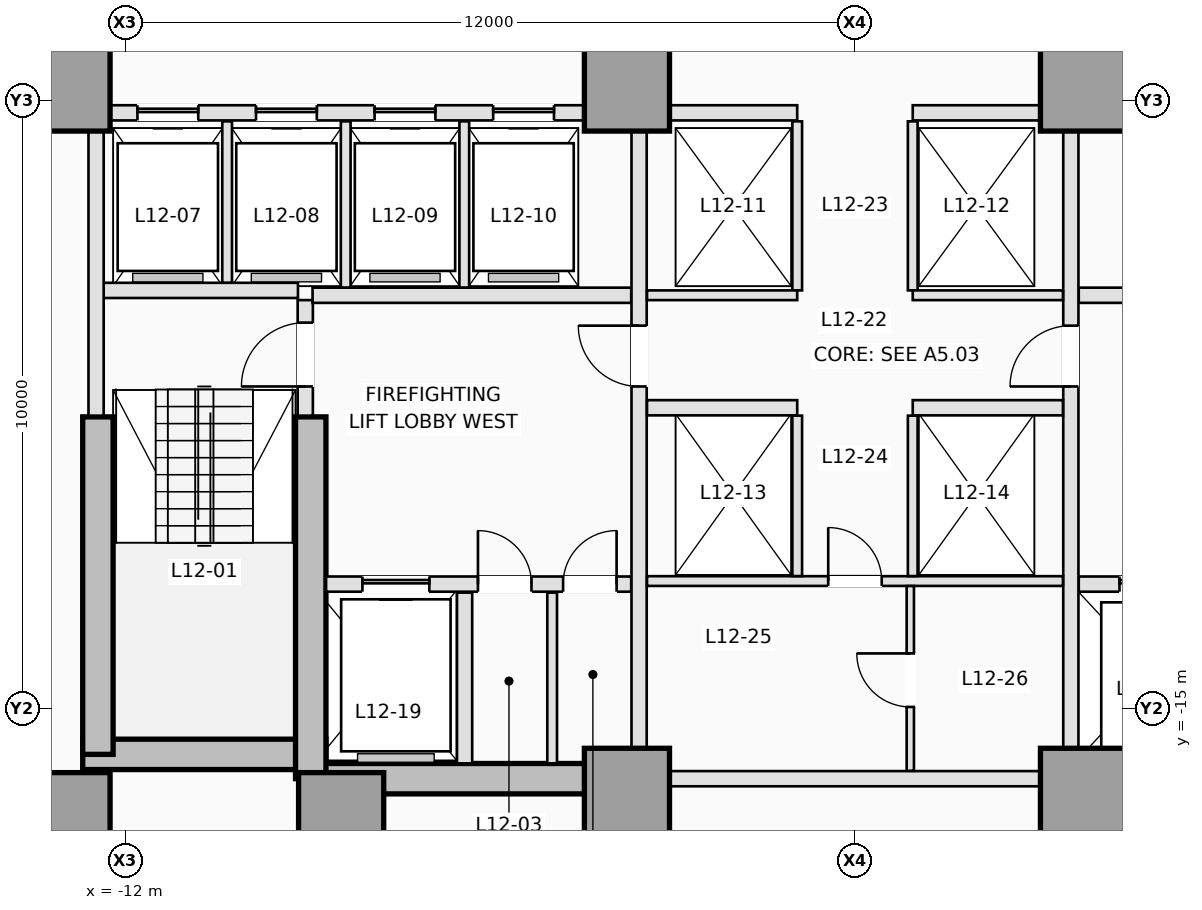
"""IFC4 building model, lengths in metres.
Left out: names, types, materials, properties, quantities, classifications, styles, units other than length and angle.
Written with IfcOpenShell. Run it as: python <this file> out.ifc"""

import sys

from ifc_helpers import new_model, si_unit, direction, frame, frame_2d, origin, origin_2d, place, context, subcontext, project, spatial, rectangle, extrude, element, fill, save


model = new_model("IFC4")
c1 = context("Model", 3, precision=1e-05, world=origin(), true_north=direction((0.0, 1.0)))
c2 = subcontext(c1, "Body", "Model", "MODEL_VIEW")
j1 = project(units=[si_unit("LENGTHUNIT", "METRE"), si_unit("PLANEANGLEUNIT", "RADIAN")], contexts=[c1])
p1 = place(None, origin())
s1 = spatial("IfcSite", under=j1, at=p1, CompositionType="ELEMENT")
p2 = place(p1, origin())
s2 = spatial("IfcBuilding", under=s1, at=p2, CompositionType="ELEMENT")
p3 = place(p2, frame((0.0, 0.0, 48.6)))
s3 = spatial("IfcBuildingStorey", under=s2, at=p3, CompositionType="ELEMENT", Elevation=48.6)
p4 = place(p3, frame((-12.7, -15.75, 0.0), z_axis=(0.0, 0.0, 1.0), x_axis=(1.0, 0.0, 0.0)))
e1 = element("IfcWall", 1, at=p4, inside=s3, PredefinedType="SHEAR", context=c2, shape_type="SweptSolid", body=[
    extrude(rectangle(XDim=4.0, YDim=0.5, at=frame_2d((2.0, 0.0))), origin(), (0.0, 0.0, 1.0), 3.5),
])
for number, where, z_axis, x_axis in (
    (2, (-8.95, -16.15, 0.0), (0.0, 0.0, 1.0), (1.0, 0.0, 0.0)),
    (3, (3.75, -16.15, 0.0), (0.0, 0.0, 1.0), (1.0, 0.0, 0.0)),
):
    element("IfcWall", number, at=place(p3, frame(where, z_axis=z_axis, x_axis=x_axis)), inside=s3, PredefinedType="SHEAR", context=c2, shape_type="SweptSolid", body=[
        extrude(rectangle(XDim=5.2, YDim=0.5, at=frame_2d((2.6, 0.0))), origin(), (0.0, 0.0, 1.0), 3.5),
    ])
p5 = place(p3, frame((-12.45, -15.75, 0.0), z_axis=(0.0, 0.0, 1.0), x_axis=(0.0, 1.0, 0.0)))
e4 = element("IfcWall", 4, at=p5, inside=s3, PredefinedType="SHEAR", context=c2, shape_type="SweptSolid", body=[
    extrude(rectangle(XDim=5.55, YDim=0.5, at=frame_2d((2.775, 0.0))), origin(), (0.0, 0.0, 1.0), 3.5),
])
p6 = place(p3, frame((-8.95, -16.15, 0.0), z_axis=(0.0, 0.0, 1.0), x_axis=(0.0, 1.0, 0.0)))
e5 = element("IfcWall", 5, at=p6, inside=s3, PredefinedType="SHEAR", context=c2, shape_type="SweptSolid", body=[
    extrude(rectangle(XDim=5.95, YDim=0.5, at=frame_2d((2.975, 0.0))), origin(), (0.0, 0.0, 1.0), 3.5),
])
for number, where, z_axis, x_axis in (
    (6, (-12.95, -16.75, 0.0), (0.0, 0.0, 1.0), (1.0, 0.0, 0.0)),
    (7, (-8.45, -16.75, 0.0), (0.0, 0.0, 1.0), (1.0, 0.0, 0.0)),
    (8, (-3.75, -16.35, 0.0), (0.0, 0.0, 1.0), (1.0, 0.0, 0.0)),
    (9, (3.75, -16.35, 0.0), (0.0, 0.0, 1.0), (1.0, 0.0, 0.0)),
    (10, (-12.95, -4.8, 0.0), (0.0, 0.0, 1.0), (1.0, 0.0, 0.0)),
    (11, (-3.75, -4.8, 0.0), (0.0, 0.0, 1.0), (1.0, 0.0, 0.0)),
    (12, (3.75, -4.8, 0.0), (0.0, 0.0, 1.0), (1.0, 0.0, 0.0)),
):
    element("IfcColumn", number, at=place(p3, frame(where, z_axis=z_axis, x_axis=x_axis)), inside=s3, PredefinedType="COLUMN", context=c2, shape_type="SweptSolid", body=[
        extrude(rectangle(XDim=1.4, YDim=1.4, at=origin_2d()), origin(), (0.0, 0.0, 1.0), 3.5),
    ])
p7 = place(p3, frame((-9.04, -10.18, 0.0), z_axis=(0.0, 0.0, 1.0), x_axis=(0.0, 1.0, 0.0)))
e13 = element("IfcWall", 13, at=p7, inside=s3, PredefinedType="PARTITIONING", context=c2, shape_type="SweptSolid", body=[
    extrude(rectangle(XDim=1.9, YDim=0.25, at=frame_2d((0.95, 0.0))), origin(), (0.0, 0.0, 1.0), 3.25),
])
p8 = place(p7, frame((0.48, 0.0, 0.0)))
e14 = element("IfcOpeningElement", 14, at=p8, cuts=e13, PredefinedType="OPENING", context=c2, shape_type="SweptSolid", body=[
    extrude(rectangle(XDim=1.05, YDim=2.15, at=frame_2d((0.525, 1.075))), frame((0.0, 0.135, 0.0), z_axis=(0.0, -1.0, 0.0), x_axis=(1.0, 0.0, 0.0)), (0.0, 0.0, 1.0), 0.27),
])
p9 = place(p3, frame((-12.38, -8.12, 0.0), z_axis=(0.0, 0.0, 1.0), x_axis=(1.0, 0.0, 0.0)))
e15 = element("IfcWall", 15, at=p9, inside=s3, PredefinedType="PARTITIONING", context=c2, shape_type="SweptSolid", body=[
    extrude(rectangle(XDim=3.22, YDim=0.25, at=frame_2d((1.61, 0.0))), origin(), (0.0, 0.0, 1.0), 3.25),
])
p10 = place(p3, frame((-12.48, -10.18, 0.0), z_axis=(0.0, 0.0, 1.0), x_axis=(0.0, 1.0, 0.0)))
e16 = element("IfcWall", 16, at=p10, inside=s3, PredefinedType="PARTITIONING", context=c2, shape_type="SweptSolid", body=[
    extrude(rectangle(XDim=4.678, YDim=0.25, at=frame_2d((2.339, 0.0))), origin(), (0.0, 0.0, 1.0), 3.25),
])
p11 = place(p3, frame((-8.698, -12.95, 0.0), z_axis=(0.0, 0.0, 1.0), x_axis=(1.0, 0.0, 0.0)))
e17 = element("IfcWall", 17, at=p11, inside=s3, PredefinedType="PARTITIONING", context=c2, shape_type="SweptSolid", body=[
    extrude(rectangle(XDim=5.018, YDim=0.25, at=frame_2d((2.509, 0.0))), origin(), (0.0, 0.0, 1.0), 3.25),
])
p12 = place(p11, frame((0.598, 0.0, 0.0)))
e18 = element("IfcOpeningElement", 18, at=p12, cuts=e17, PredefinedType="OPENING", context=c2, shape_type="SweptSolid", body=[
    extrude(rectangle(XDim=1.1, YDim=2.15, at=frame_2d((0.55, 1.075))), frame((0.0, 0.135, 0.0), z_axis=(0.0, -1.0, 0.0), x_axis=(1.0, 0.0, 0.0)), (0.0, 0.0, 1.0), 0.27),
])
p13 = place(p11, frame((2.498, 0.0, 0.0)))
e19 = element("IfcOpeningElement", 19, at=p13, cuts=e17, PredefinedType="OPENING", context=c2, shape_type="SweptSolid", body=[
    extrude(rectangle(XDim=0.88, YDim=2.1, at=frame_2d((0.44, 1.05))), frame((0.0, 0.135, 0.0), z_axis=(0.0, -1.0, 0.0), x_axis=(1.0, 0.0, 0.0)), (0.0, 0.0, 1.0), 0.27),
])
p14 = place(p11, frame((3.898, 0.0, 0.0)))
e20 = element("IfcOpeningElement", 20, at=p14, cuts=e17, PredefinedType="OPENING", context=c2, shape_type="SweptSolid", body=[
    extrude(rectangle(XDim=0.88, YDim=2.1, at=frame_2d((0.44, 1.05))), frame((0.0, 0.135, 0.0), z_axis=(0.0, -1.0, 0.0), x_axis=(1.0, 0.0, 0.0)), (0.0, 0.0, 1.0), 0.27),
])
p15 = place(p3, frame((3.68, -12.95, 0.0), z_axis=(0.0, 0.0, 1.0), x_axis=(1.0, 0.0, 0.0)))
e21 = element("IfcWall", 21, at=p15, inside=s3, PredefinedType="PARTITIONING", context=c2, shape_type="SweptSolid", body=[
    extrude(rectangle(XDim=5.018, YDim=0.25, at=frame_2d((2.509, 0.0))), origin(), (0.0, 0.0, 1.0), 3.25),
])
p16 = place(p15, frame((3.32, 0.0, 0.0)))
e22 = element("IfcOpeningElement", 22, at=p16, cuts=e21, PredefinedType="OPENING", context=c2, shape_type="SweptSolid", body=[
    extrude(rectangle(XDim=1.1, YDim=2.15, at=frame_2d((0.55, 1.075))), frame((0.0, 0.135, 0.0), z_axis=(0.0, -1.0, 0.0), x_axis=(1.0, 0.0, 0.0)), (0.0, 0.0, 1.0), 0.27),
])
p17 = place(p15, frame((0.67, 0.0, 0.0)))
e23 = element("IfcOpeningElement", 23, at=p17, cuts=e21, PredefinedType="OPENING", context=c2, shape_type="SweptSolid", body=[
    extrude(rectangle(XDim=1.2, YDim=2.15, at=frame_2d((0.6, 1.075))), frame((0.0, 0.135, 0.0), z_axis=(0.0, -1.0, 0.0), x_axis=(1.0, 0.0, 0.0)), (0.0, 0.0, 1.0), 0.27),
])
p18 = place(p3, frame((-6.42, -15.898, 0.0), z_axis=(0.0, 0.0, 1.0), x_axis=(0.0, 1.0, 0.0)))
e24 = element("IfcWall", 24, at=p18, inside=s3, PredefinedType="PARTITIONING", context=c2, shape_type="SweptSolid", body=[
    extrude(rectangle(XDim=2.808, YDim=0.25, at=frame_2d((1.404, 0.0))), origin(), (0.0, 0.0, 1.0), 3.25),
])
p19 = place(p3, frame((-4.98, -15.898, 0.0), z_axis=(0.0, 0.0, 1.0), x_axis=(0.0, 1.0, 0.0)))
e25 = element("IfcWall", 25, at=p19, inside=s3, PredefinedType="PARTITIONING", context=c2, shape_type="SweptSolid", body=[
    extrude(rectangle(XDim=2.808, YDim=0.16, at=frame_2d((1.404, 0.0))), origin(), (0.0, 0.0, 1.0), 3.25),
])
for number, where, z_axis, x_axis in (
    (26, (-8.92, -8.2, 0.0), (0.0, 0.0, 1.0), (1.0, 0.0, 0.0)),
    (27, (3.68, -8.2, 0.0), (0.0, 0.0, 1.0), (1.0, 0.0, 0.0)),
):
    element("IfcWall", number, at=place(p3, frame(where, z_axis=z_axis, x_axis=x_axis)), inside=s3, PredefinedType="PARTITIONING", context=c2, shape_type="SweptSolid", body=[
        extrude(rectangle(XDim=5.24, YDim=0.25, at=frame_2d((2.62, 0.0))), origin(), (0.0, 0.0, 1.0), 3.25),
    ])
p20 = place(p3, frame((-3.55, -15.648, 0.0), z_axis=(0.0, 0.0, 1.0), x_axis=(0.0, 1.0, 0.0)))
e28 = element("IfcWall", 28, at=p20, inside=s3, PredefinedType="PARTITIONING", context=c2, shape_type="SweptSolid", body=[
    extrude(rectangle(XDim=10.146, YDim=0.25, at=frame_2d((5.073, 0.0))), origin(), (0.0, 0.0, 1.0), 3.25),
])
p21 = place(p20, frame((5.948, 0.0, 0.0)))
e29 = element("IfcOpeningElement", 29, at=p21, cuts=e28, PredefinedType="OPENING", context=c2, shape_type="SweptSolid", body=[
    extrude(rectangle(XDim=1.0, YDim=2.15, at=frame_2d((0.5, 1.075))), frame((0.0, 0.135, 0.0), z_axis=(0.0, -1.0, 0.0), x_axis=(1.0, 0.0, 0.0)), (0.0, 0.0, 1.0), 0.27),
])
p22 = place(p3, frame((3.55, -15.648, 0.0), z_axis=(0.0, 0.0, 1.0), x_axis=(0.0, 1.0, 0.0)))
e30 = element("IfcWall", 30, at=p22, inside=s3, PredefinedType="PARTITIONING", context=c2, shape_type="SweptSolid", body=[
    extrude(rectangle(XDim=10.146, YDim=0.25, at=frame_2d((5.073, 0.0))), origin(), (0.0, 0.0, 1.0), 3.25),
])
p23 = place(p22, frame((5.948, 0.0, 0.0)))
e31 = element("IfcOpeningElement", 31, at=p23, cuts=e30, PredefinedType="OPENING", context=c2, shape_type="SweptSolid", body=[
    extrude(rectangle(XDim=1.0, YDim=2.15, at=frame_2d((0.5, 1.075))), frame((0.0, 0.135, 0.0), z_axis=(0.0, -1.0, 0.0), x_axis=(1.0, 0.0, 0.0)), (0.0, 0.0, 1.0), 0.27),
])
p24 = place(p3, frame((-12.248, -5.2, 0.0), z_axis=(0.0, 0.0, 1.0), x_axis=(1.0, 0.0, 0.0)))
e32 = element("IfcWall", 32, at=p24, inside=s3, PredefinedType="PARTITIONING", context=c2, shape_type="SweptSolid", body=[
    extrude(rectangle(XDim=7.796, YDim=0.25, at=frame_2d((3.898, 0.0))), origin(), (0.0, 0.0, 1.0), 3.25),
])
p25 = place(p24, frame((0.448, 0.0, 0.0)))
e33 = element("IfcOpeningElement", 33, at=p25, cuts=e32, PredefinedType="OPENING", context=c2, shape_type="SweptSolid", body=[
    extrude(rectangle(XDim=1.0, YDim=2.15, at=frame_2d((0.5, 1.075))), frame((0.0, 0.135, 0.0), z_axis=(0.0, -1.0, 0.0), x_axis=(1.0, 0.0, 0.0)), (0.0, 0.0, 1.0), 0.27),
])
p26 = place(p24, frame((2.398, 0.0, 0.0)))
e34 = element("IfcOpeningElement", 34, at=p26, cuts=e32, PredefinedType="OPENING", context=c2, shape_type="SweptSolid", body=[
    extrude(rectangle(XDim=1.0, YDim=2.15, at=frame_2d((0.5, 1.075))), frame((0.0, 0.135, 0.0), z_axis=(0.0, -1.0, 0.0), x_axis=(1.0, 0.0, 0.0)), (0.0, 0.0, 1.0), 0.27),
])
p27 = place(p24, frame((4.348, 0.0, 0.0)))
e35 = element("IfcOpeningElement", 35, at=p27, cuts=e32, PredefinedType="OPENING", context=c2, shape_type="SweptSolid", body=[
    extrude(rectangle(XDim=1.0, YDim=2.15, at=frame_2d((0.5, 1.075))), frame((0.0, 0.135, 0.0), z_axis=(0.0, -1.0, 0.0), x_axis=(1.0, 0.0, 0.0)), (0.0, 0.0, 1.0), 0.27),
])
p28 = place(p24, frame((6.298, 0.0, 0.0)))
e36 = element("IfcOpeningElement", 36, at=p28, cuts=e32, PredefinedType="OPENING", context=c2, shape_type="SweptSolid", body=[
    extrude(rectangle(XDim=1.0, YDim=2.15, at=frame_2d((0.5, 1.075))), frame((0.0, 0.135, 0.0), z_axis=(0.0, -1.0, 0.0), x_axis=(1.0, 0.0, 0.0)), (0.0, 0.0, 1.0), 0.27),
])
for number, where, z_axis, x_axis in (
    (37, (-3.048, -5.2, 0.0), (0.0, 0.0, 1.0), (1.0, 0.0, 0.0)),
    (38, (0.95, -5.2, 0.0), (0.0, 0.0, 1.0), (1.0, 0.0, 0.0)),
):
    element("IfcWall", number, at=place(p3, frame(where, z_axis=z_axis, x_axis=x_axis)), inside=s3, PredefinedType="PARTITIONING", context=c2, shape_type="SweptSolid", body=[
        extrude(rectangle(XDim=2.098, YDim=0.25, at=frame_2d((1.049, 0.0))), origin(), (0.0, 0.0, 1.0), 3.25),
    ])
p29 = place(p3, frame((-10.325, -7.993, 0.0), z_axis=(0.0, 0.0, 1.0), x_axis=(0.0, 1.0, 0.0)))
e39 = element("IfcWall", 39, at=p29, inside=s3, PredefinedType="PARTITIONING", context=c2, shape_type="SweptSolid", body=[
    extrude(rectangle(XDim=2.653, YDim=0.16, at=frame_2d((1.326, 0.0))), origin(), (0.0, 0.0, 1.0), 3.25),
])
for number, where, z_axis, x_axis in (
    (40, (-8.375, -8.073, 0.0), (0.0, 0.0, 1.0), (0.0, 1.0, 0.0)),
    (41, (-6.425, -8.073, 0.0), (0.0, 0.0, 1.0), (0.0, 1.0, 0.0)),
):
    element("IfcWall", number, at=place(p3, frame(where, z_axis=z_axis, x_axis=x_axis)), inside=s3, PredefinedType="PARTITIONING", context=c2, shape_type="SweptSolid", body=[
        extrude(rectangle(XDim=2.733, YDim=0.16, at=frame_2d((1.366, 0.0))), origin(), (0.0, 0.0, 1.0), 3.25),
    ])
p30 = place(p3, frame((-3.048, -16.15, 0.0), z_axis=(0.0, 0.0, 1.0), x_axis=(1.0, 0.0, 0.0)))
e42 = element("IfcWall", 42, at=p30, inside=s3, PredefinedType="PARTITIONING", context=c2, shape_type="SweptSolid", body=[
    extrude(rectangle(XDim=6.096, YDim=0.25, at=frame_2d((3.048, 0.0))), origin(), (0.0, 0.0, 1.0), 2.3),
])
for number, where, z_axis, x_axis in (
    (43, (-0.95, -8.12, 0.0), (0.0, 0.0, 1.0), (0.0, 1.0, 0.0)),
    (44, (0.95, -8.12, 0.0), (0.0, 0.0, 1.0), (0.0, 1.0, 0.0)),
):
    element("IfcWall", number, at=place(p3, frame(where, z_axis=z_axis, x_axis=x_axis)), inside=s3, PredefinedType="PARTITIONING", context=c2, shape_type="SweptSolid", body=[
        extrude(rectangle(XDim=2.78, YDim=0.16, at=frame_2d((1.39, 0.0))), origin(), (0.0, 0.0, 1.0), 3.25),
    ])
for number, where, z_axis, x_axis in (
    (45, (-3.42, -8.2, 0.0), (0.0, 0.0, 1.0), (1.0, 0.0, 0.0)),
    (46, (0.95, -8.2, 0.0), (0.0, 0.0, 1.0), (1.0, 0.0, 0.0)),
):
    element("IfcWall", number, at=place(p3, frame(where, z_axis=z_axis, x_axis=x_axis)), inside=s3, PredefinedType="PARTITIONING", context=c2, shape_type="SweptSolid", body=[
        extrude(rectangle(XDim=2.47, YDim=0.16, at=frame_2d((1.235, 0.0))), origin(), (0.0, 0.0, 1.0), 3.25),
    ])
for number, where, z_axis, x_axis in (
    (47, (-3.42, -10.05, 0.0), (0.0, 0.0, 1.0), (1.0, 0.0, 0.0)),
    (48, (0.95, -10.05, 0.0), (0.0, 0.0, 1.0), (1.0, 0.0, 0.0)),
):
    element("IfcWall", number, at=place(p3, frame(where, z_axis=z_axis, x_axis=x_axis)), inside=s3, PredefinedType="PARTITIONING", context=c2, shape_type="SweptSolid", body=[
        extrude(rectangle(XDim=2.47, YDim=0.25, at=frame_2d((1.235, 0.0))), origin(), (0.0, 0.0, 1.0), 3.25),
    ])
p31 = place(p3, frame((-3.42, -12.9, 0.0), z_axis=(0.0, 0.0, 1.0), x_axis=(1.0, 0.0, 0.0)))
e49 = element("IfcWall", 49, at=p31, inside=s3, PredefinedType="PARTITIONING", context=c2, shape_type="SweptSolid", body=[
    extrude(rectangle(XDim=6.84, YDim=0.16, at=frame_2d((3.42, 0.0))), origin(), (0.0, 0.0, 1.0), 3.25),
])
p32 = place(p31, frame((2.98, 0.0, 0.0)))
e50 = element("IfcOpeningElement", 50, at=p32, cuts=e49, PredefinedType="OPENING", context=c2, shape_type="SweptSolid", body=[
    extrude(rectangle(XDim=0.88, YDim=2.12, at=frame_2d((0.44, 1.06))), frame((0.0, 0.09, 0.0), z_axis=(0.0, -1.0, 0.0), x_axis=(1.0, 0.0, 0.0)), (0.0, 0.0, 1.0), 0.18),
])
for number, where, z_axis, x_axis in (
    (51, (-0.95, -12.818, 0.0), (0.0, 0.0, 1.0), (0.0, 1.0, 0.0)),
    (52, (0.95, -12.818, 0.0), (0.0, 0.0, 1.0), (0.0, 1.0, 0.0)),
):
    element("IfcWall", number, at=place(p3, frame(where, z_axis=z_axis, x_axis=x_axis)), inside=s3, PredefinedType="PARTITIONING", context=c2, shape_type="SweptSolid", body=[
        extrude(rectangle(XDim=2.638, YDim=0.16, at=frame_2d((1.319, 0.0))), origin(), (0.0, 0.0, 1.0), 3.25),
    ])
p33 = place(p3, frame((0.91, -16.02, 0.0), z_axis=(0.0, 0.0, 1.0), x_axis=(0.0, 1.0, 0.0)))
e53 = element("IfcWall", 53, at=p33, inside=s3, PredefinedType="PARTITIONING", context=c2, shape_type="SweptSolid", body=[
    extrude(rectangle(XDim=3.038, YDim=0.12, at=frame_2d((1.519, 0.0))), origin(), (0.0, 0.0, 1.0), 3.25),
])
p34 = place(p33, frame((1.05, 0.0, 0.0)))
e54 = element("IfcOpeningElement", 54, at=p34, cuts=e53, PredefinedType="OPENING", context=c2, shape_type="SweptSolid", body=[
    extrude(rectangle(XDim=0.88, YDim=2.12, at=frame_2d((0.44, 1.06))), frame((0.0, 0.07, 0.0), z_axis=(0.0, -1.0, 0.0), x_axis=(1.0, 0.0, 0.0)), (0.0, 0.0, 1.0), 0.14),
])
p35 = place(p25, origin())
e55 = element("IfcDoor", 55, at=p35, inside=s3, OperationType="SLIDING_TO_LEFT", PredefinedType="DOOR", context=c2, shape_type="SweptSolid", body=[
    extrude(rectangle(XDim=1.0, YDim=2.15, at=frame_2d((0.5, 1.075))), frame((0.0, 0.025, 0.0), z_axis=(0.0, -1.0, 0.0), x_axis=(1.0, 0.0, 0.0)), (0.0, 0.0, 1.0), 0.05),
])
fill(e33, e55)
p36 = place(p26, origin())
e56 = element("IfcDoor", 56, at=p36, inside=s3, OperationType="SLIDING_TO_LEFT", PredefinedType="DOOR", context=c2, shape_type="SweptSolid", body=[
    extrude(rectangle(XDim=1.0, YDim=2.15, at=frame_2d((0.5, 1.075))), frame((0.0, 0.025, 0.0), z_axis=(0.0, -1.0, 0.0), x_axis=(1.0, 0.0, 0.0)), (0.0, 0.0, 1.0), 0.05),
])
fill(e34, e56)
p37 = place(p27, origin())
e57 = element("IfcDoor", 57, at=p37, inside=s3, OperationType="SLIDING_TO_LEFT", PredefinedType="DOOR", context=c2, shape_type="SweptSolid", body=[
    extrude(rectangle(XDim=1.0, YDim=2.15, at=frame_2d((0.5, 1.075))), frame((0.0, 0.025, 0.0), z_axis=(0.0, -1.0, 0.0), x_axis=(1.0, 0.0, 0.0)), (0.0, 0.0, 1.0), 0.05),
])
fill(e35, e57)
p38 = place(p28, origin())
e58 = element("IfcDoor", 58, at=p38, inside=s3, OperationType="SLIDING_TO_LEFT", PredefinedType="DOOR", context=c2, shape_type="SweptSolid", body=[
    extrude(rectangle(XDim=1.0, YDim=2.15, at=frame_2d((0.5, 1.075))), frame((0.0, 0.025, 0.0), z_axis=(0.0, -1.0, 0.0), x_axis=(1.0, 0.0, 0.0)), (0.0, 0.0, 1.0), 0.05),
])
fill(e36, e58)
p39 = place(p12, origin())
e59 = element("IfcDoor", 59, at=p39, inside=s3, OperationType="SLIDING_TO_LEFT", PredefinedType="DOOR", context=c2, shape_type="SweptSolid", body=[
    extrude(rectangle(XDim=1.1, YDim=2.15, at=frame_2d((0.55, 1.075))), frame((0.0, 0.025, 0.0), z_axis=(0.0, -1.0, 0.0), x_axis=(1.0, 0.0, 0.0)), (0.0, 0.0, 1.0), 0.05),
])
fill(e18, e59)
p40 = place(p17, origin())
e60 = element("IfcDoor", 60, at=p40, inside=s3, OperationType="SLIDING_TO_LEFT", PredefinedType="DOOR", context=c2, shape_type="SweptSolid", body=[
    extrude(rectangle(XDim=1.2, YDim=2.15, at=frame_2d((0.6, 1.075))), frame((0.0, 0.025, 0.0), z_axis=(0.0, -1.0, 0.0), x_axis=(1.0, 0.0, 0.0)), (0.0, 0.0, 1.0), 0.05),
])
fill(e23, e60)
p41 = place(p8, origin())
e61 = element("IfcDoor", 61, at=p41, inside=s3, OperationType="SINGLE_SWING_LEFT", PredefinedType="DOOR", context=c2, shape_type="SweptSolid", body=[
    extrude(rectangle(XDim=1.05, YDim=2.15, at=frame_2d((0.525, 1.075))), frame((0.0, 0.025, 0.0), z_axis=(0.0, -1.0, 0.0), x_axis=(1.0, 0.0, 0.0)), (0.0, 0.0, 1.0), 0.05),
])
fill(e14, e61)
p42 = place(p13, origin())
e62 = element("IfcDoor", 62, at=p42, inside=s3, OperationType="SINGLE_SWING_LEFT", PredefinedType="TRAPDOOR", context=c2, shape_type="SweptSolid", body=[
    extrude(rectangle(XDim=0.88, YDim=2.1, at=frame_2d((0.44, 1.05))), frame((0.0, 0.025, 0.0), z_axis=(0.0, -1.0, 0.0), x_axis=(1.0, 0.0, 0.0)), (0.0, 0.0, 1.0), 0.05),
])
fill(e19, e62)
p43 = place(p14, origin())
e63 = element("IfcDoor", 63, at=p43, inside=s3, OperationType="SINGLE_SWING_RIGHT", PredefinedType="TRAPDOOR", context=c2, shape_type="SweptSolid", body=[
    extrude(rectangle(XDim=0.88, YDim=2.1, at=frame_2d((0.44, 1.05))), frame((0.0, 0.025, 0.0), z_axis=(0.0, -1.0, 0.0), x_axis=(1.0, 0.0, 0.0)), (0.0, 0.0, 1.0), 0.05),
])
fill(e20, e63)
p44 = place(p21, origin())
e64 = element("IfcDoor", 64, at=p44, inside=s3, OperationType="SINGLE_SWING_RIGHT", PredefinedType="DOOR", context=c2, shape_type="SweptSolid", body=[
    extrude(rectangle(XDim=1.0, YDim=2.15, at=frame_2d((0.5, 1.075))), frame((0.0, 0.025, 0.0), z_axis=(0.0, -1.0, 0.0), x_axis=(1.0, 0.0, 0.0)), (0.0, 0.0, 1.0), 0.05),
])
fill(e29, e64)
p45 = place(p23, origin())
e65 = element("IfcDoor", 65, at=p45, inside=s3, OperationType="SINGLE_SWING_LEFT", PredefinedType="DOOR", context=c2, shape_type="SweptSolid", body=[
    extrude(rectangle(XDim=1.0, YDim=2.15, at=frame_2d((0.5, 1.075))), frame((0.0, 0.025, 0.0), z_axis=(0.0, -1.0, 0.0), x_axis=(1.0, 0.0, 0.0)), (0.0, 0.0, 1.0), 0.05),
])
fill(e31, e65)
p46 = place(p32, origin())
e66 = element("IfcDoor", 66, at=p46, inside=s3, OperationType="SINGLE_SWING_LEFT", PredefinedType="DOOR", context=c2, shape_type="SweptSolid", body=[
    extrude(rectangle(XDim=0.88, YDim=2.12, at=frame_2d((0.44, 1.06))), frame((0.0, 0.025, 0.0), z_axis=(0.0, -1.0, 0.0), x_axis=(1.0, 0.0, 0.0)), (0.0, 0.0, 1.0), 0.05),
])
fill(e50, e66)
p47 = place(p34, origin())
e67 = element("IfcDoor", 67, at=p47, inside=s3, OperationType="SINGLE_SWING_RIGHT", PredefinedType="DOOR", context=c2, shape_type="SweptSolid", body=[
    extrude(rectangle(XDim=0.88, YDim=2.12, at=frame_2d((0.44, 1.06))), frame((0.0, 0.025, 0.0), z_axis=(0.0, -1.0, 0.0), x_axis=(1.0, 0.0, 0.0)), (0.0, 0.0, 1.0), 0.05),
])
fill(e54, e67)
save(model, sys.argv[1])
